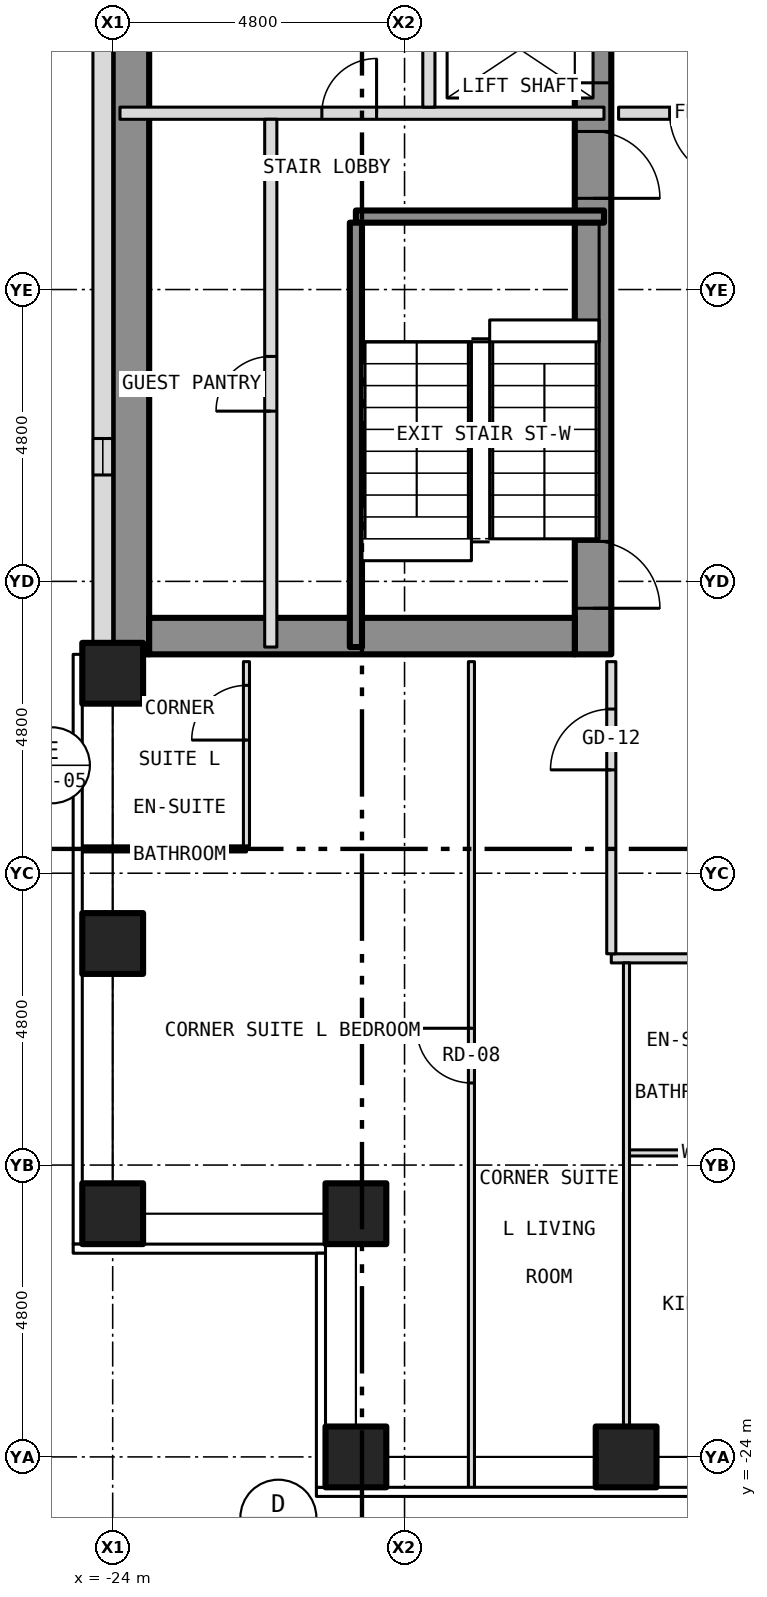
"""IFC4 building model, lengths in metres.
Left out: names, types, materials, properties, quantities, classifications, styles, units other than length and angle.
Written with IfcOpenShell. Run it as: python <this file> out.ifc"""

import sys

from ifc_helpers import new_model, si_unit, direction, frame, frame_2d, origin, origin_2d, place, context, subcontext, project, spatial, rectangle, hollow_rectangle, extrude, element, fill, save


model = new_model("IFC4")
c1 = context("Model", 3, precision=1e-05, world=origin(), true_north=direction((0.0, 1.0)))
c2 = subcontext(c1, "Body", "Model", "MODEL_VIEW")
j1 = project(units=[si_unit("LENGTHUNIT", "METRE"), si_unit("PLANEANGLEUNIT", "RADIAN")], contexts=[c1])
p1 = place(None, origin())
s1 = spatial("IfcSite", under=j1, at=p1, CompositionType="ELEMENT")
p2 = place(p1, origin())
s2 = spatial("IfcBuilding", under=s1, at=p2, CompositionType="ELEMENT")
p3 = place(p2, frame((0.0, 0.0, 53.0)))
s3 = spatial("IfcBuildingStorey", under=s2, at=p3, CompositionType="ELEMENT", Elevation=53.0)
for number, where, z_axis, x_axis in (
    (1, (-20.0, -24.0, -0.15), (0.0, 0.0, 1.0), (1.0, 0.0, 0.0)),
    (2, (-15.556, -24.0, -0.15), (0.0, 0.0, 1.0), (1.0, 0.0, 0.0)),
    (3, (-24.0, -20.0, -0.15), (0.0, 0.0, 1.0), (1.0, 0.0, 0.0)),
    (4, (-24.0, -15.556, -0.15), (0.0, 0.0, 1.0), (1.0, 0.0, 0.0)),
    (5, (-24.0, -11.111, -0.15), (0.0, 0.0, 1.0), (1.0, 0.0, 0.0)),
    (6, (-20.0, -20.0, -0.15), (0.0, 0.0, 1.0), (1.0, 0.0, 0.0)),
):
    element("IfcColumn", number, at=place(p3, frame(where, z_axis=z_axis, x_axis=x_axis)), inside=s3, PredefinedType="COLUMN", context=c2, shape_type="SweptSolid", body=[
        extrude(hollow_rectangle(XDim=1.0, YDim=1.0, WallThickness=0.06, at=origin_2d()), origin(), (0.0, 0.0, 1.0), 3.5),
    ])
p4 = place(p3, frame((-16.1, -10.8, 0.0), z_axis=(0.0, 0.0, 1.0), x_axis=(0.0, 1.0, 0.0)))
e7 = element("IfcWall", 7, at=p4, inside=s3, PredefinedType="SHEAR", context=c2, shape_type="SweptSolid", body=[
    extrude(rectangle(XDim=21.6, YDim=0.6, at=frame_2d((10.8, 0.0))), origin(), (0.0, 0.0, 1.0), 3.25),
])
p5 = place(p4, frame((9.4, 0.0, 0.0)))
e8 = element("IfcOpeningElement", 8, at=p5, cuts=e7, PredefinedType="OPENING", context=c2, shape_type="SweptSolid", body=[
    extrude(rectangle(XDim=1.1, YDim=2.1, at=frame_2d((0.55, 1.05))), frame((0.0, 0.312, 0.0), z_axis=(0.0, -1.0, 0.0), x_axis=(1.0, 0.0, 0.0)), (0.0, 0.0, 1.0), 0.624),
])
p6 = place(p4, frame((11.5, 0.0, 0.0)))
e9 = element("IfcOpeningElement", 9, at=p6, cuts=e7, PredefinedType="OPENING", context=c2, shape_type="SweptSolid", body=[
    extrude(rectangle(XDim=1.1, YDim=2.1, at=frame_2d((0.55, 1.05))), frame((0.0, 0.312, 0.0), z_axis=(0.0, -1.0, 0.0), x_axis=(1.0, 0.0, 0.0)), (0.0, 0.0, 1.0), 0.624),
])
p7 = place(p4, frame((13.6, 0.0, 0.0)))
e10 = element("IfcOpeningElement", 10, at=p7, cuts=e7, PredefinedType="OPENING", context=c2, shape_type="SweptSolid", body=[
    extrude(rectangle(XDim=1.1, YDim=2.1, at=frame_2d((0.55, 1.05))), frame((0.0, 0.312, 0.0), z_axis=(0.0, -1.0, 0.0), x_axis=(1.0, 0.0, 0.0)), (0.0, 0.0, 1.0), 0.624),
])
p8 = place(p4, frame((15.7, 0.0, 0.0)))
e11 = element("IfcOpeningElement", 11, at=p8, cuts=e7, PredefinedType="OPENING", context=c2, shape_type="SweptSolid", body=[
    extrude(rectangle(XDim=1.1, YDim=2.1, at=frame_2d((0.55, 1.05))), frame((0.0, 0.312, 0.0), z_axis=(0.0, -1.0, 0.0), x_axis=(1.0, 0.0, 0.0)), (0.0, 0.0, 1.0), 0.624),
])
p9 = place(p4, frame((17.8, 0.0, 0.0)))
e12 = element("IfcOpeningElement", 12, at=p9, cuts=e7, PredefinedType="OPENING", context=c2, shape_type="SweptSolid", body=[
    extrude(rectangle(XDim=1.1, YDim=2.1, at=frame_2d((0.55, 1.05))), frame((0.0, 0.312, 0.0), z_axis=(0.0, -1.0, 0.0), x_axis=(1.0, 0.0, 0.0)), (0.0, 0.0, 1.0), 0.624),
])
p10 = place(p4, frame((0.758, 0.0, 0.0)))
e13 = element("IfcOpeningElement", 13, at=p10, cuts=e7, PredefinedType="OPENING", context=c2, shape_type="SweptSolid", body=[
    extrude(rectangle(XDim=1.1, YDim=2.1, at=frame_2d((0.55, 1.05))), frame((0.0, 0.312, 0.0), z_axis=(0.0, -1.0, 0.0), x_axis=(1.0, 0.0, 0.0)), (0.0, 0.0, 1.0), 0.624),
])
p11 = place(p4, frame((7.5, 0.0, 0.0)))
e14 = element("IfcOpeningElement", 14, at=p11, cuts=e7, PredefinedType="OPENING", context=c2, shape_type="SweptSolid", body=[
    extrude(rectangle(XDim=1.1, YDim=2.1, at=frame_2d((0.55, 1.05))), frame((0.0, 0.312, 0.0), z_axis=(0.0, -1.0, 0.0), x_axis=(1.0, 0.0, 0.0)), (0.0, 0.0, 1.0), 0.624),
])
p12 = place(p3, frame((-23.7, -10.8, 0.0), z_axis=(0.0, 0.0, 1.0), x_axis=(0.0, 1.0, 0.0)))
e15 = element("IfcWall", 15, at=p12, inside=s3, PredefinedType="SHEAR", context=c2, shape_type="SweptSolid", body=[
    extrude(rectangle(XDim=21.6, YDim=0.6, at=frame_2d((10.8, 0.0))), origin(), (0.0, 0.0, 1.0), 3.25),
])
p13 = place(p3, frame((-23.4, -10.5, 0.0), z_axis=(0.0, 0.0, 1.0), x_axis=(1.0, 0.0, 0.0)))
e16 = element("IfcWall", 16, at=p13, inside=s3, PredefinedType="SHEAR", context=c2, shape_type="SweptSolid", body=[
    extrude(rectangle(XDim=7.0, YDim=0.6, at=frame_2d((3.5, 0.0))), origin(), (0.0, 0.0, 1.0), 3.25),
])
p14 = place(p3, frame((-24.163, 10.8, 0.0), z_axis=(0.0, 0.0, 1.0), x_axis=(0.0, -1.0, 0.0)))
e17 = element("IfcWall", 17, at=p14, inside=s3, PredefinedType="SOLIDWALL", context=c2, shape_type="SweptSolid", body=[
    extrude(rectangle(XDim=21.6, YDim=0.325, at=frame_2d((10.8, 0.0))), origin(), (0.0, 0.0, 1.0), 3.5),
])
p15 = place(p14, frame((18.05, 0.0, 1.0)))
e18 = element("IfcOpeningElement", 18, at=p15, cuts=e17, PredefinedType="OPENING", context=c2, shape_type="SweptSolid", body=[
    extrude(rectangle(XDim=0.6, YDim=1.5, at=frame_2d((0.3, 0.75))), frame((0.0, 0.175, 0.0), z_axis=(0.0, -1.0, 0.0), x_axis=(1.0, 0.0, 0.0)), (0.0, 0.0, 1.0), 0.349),
])
p16 = place(p3, frame((-15.55, -19.0, 0.0), z_axis=(0.0, 0.0, 1.0), x_axis=(1.0, 0.0, 0.0)))
e19 = element("IfcWall", 19, at=p16, inside=s3, PredefinedType="PARTITIONING", context=c2, shape_type="SweptSolid", body=[
    extrude(rectangle(XDim=2.2, YDim=0.1, at=frame_2d((1.1, 0.0))), origin(), (0.0, 0.0, 1.0), 3.35),
])
p17 = place(p3, frame((-15.8, -15.8, 0.0), z_axis=(0.0, 0.0, 1.0), x_axis=(1.0, 0.0, 0.0)))
e20 = element("IfcWall", 20, at=p17, inside=s3, PredefinedType="PARTITIONING", context=c2, shape_type="SweptSolid", body=[
    extrude(rectangle(XDim=31.6, YDim=0.15, at=frame_2d((15.8, 0.0))), origin(), (0.0, 0.0, 1.0), 3.35),
])
p18 = place(p17, frame((3.067, 0.0, 0.0)))
e21 = element("IfcOpeningElement", 21, at=p18, cuts=e20, PredefinedType="OPENING", context=c2, shape_type="SweptSolid", body=[
    extrude(rectangle(XDim=1.0, YDim=2.1, at=frame_2d((0.5, 1.05))), frame((0.0, 0.087, 0.0), z_axis=(0.0, -1.0, 0.0), x_axis=(1.0, 0.0, 0.0)), (0.0, 0.0, 1.0), 0.174),
])
p19 = place(p17, frame((5.311, 0.0, 0.0)))
e22 = element("IfcOpeningElement", 22, at=p19, cuts=e20, PredefinedType="OPENING", context=c2, shape_type="SweptSolid", body=[
    extrude(rectangle(XDim=1.0, YDim=2.1, at=frame_2d((0.5, 1.05))), frame((0.0, 0.087, 0.0), z_axis=(0.0, -1.0, 0.0), x_axis=(1.0, 0.0, 0.0)), (0.0, 0.0, 1.0), 0.174),
])
p20 = place(p17, frame((9.756, 0.0, 0.0)))
e23 = element("IfcOpeningElement", 23, at=p20, cuts=e20, PredefinedType="OPENING", context=c2, shape_type="SweptSolid", body=[
    extrude(rectangle(XDim=1.0, YDim=2.1, at=frame_2d((0.5, 1.05))), frame((0.0, 0.087, 0.0), z_axis=(0.0, -1.0, 0.0), x_axis=(1.0, 0.0, 0.0)), (0.0, 0.0, 1.0), 0.174),
])
p21 = place(p17, frame((15.311, 0.0, 0.0)))
e24 = element("IfcOpeningElement", 24, at=p21, cuts=e20, PredefinedType="OPENING", context=c2, shape_type="SweptSolid", body=[
    extrude(rectangle(XDim=1.0, YDim=2.1, at=frame_2d((0.5, 1.05))), frame((0.0, 0.087, 0.0), z_axis=(0.0, -1.0, 0.0), x_axis=(1.0, 0.0, 0.0)), (0.0, 0.0, 1.0), 0.174),
])
p22 = place(p17, frame((22.245, 0.0, 0.0)))
e25 = element("IfcOpeningElement", 25, at=p22, cuts=e20, PredefinedType="OPENING", context=c2, shape_type="SweptSolid", body=[
    extrude(rectangle(XDim=1.0, YDim=2.1, at=frame_2d((0.5, 1.05))), frame((0.0, 0.087, 0.0), z_axis=(0.0, -1.0, 0.0), x_axis=(1.0, 0.0, 0.0)), (0.0, 0.0, 1.0), 0.174),
])
p23 = place(p3, frame((-24.53, -14.0, 0.0), z_axis=(0.0, 0.0, 1.0), x_axis=(1.0, 0.0, 0.0)))
e26 = element("IfcWall", 26, at=p23, inside=s3, PredefinedType="PARTITIONING", context=c2, shape_type="SweptSolid", body=[
    extrude(rectangle(XDim=2.73, YDim=0.1, at=frame_2d((1.365, 0.0))), origin(), (0.0, 0.0, 1.0), 3.35),
])
p24 = place(p3, frame((-20.0, -3.6, 0.0), z_axis=(0.0, 0.0, 1.0), x_axis=(1.0, 0.0, 0.0)))
e27 = element("IfcWall", 27, at=p24, inside=s3, PredefinedType="SHEAR", context=c2, shape_type="SweptSolid", body=[
    extrude(rectangle(XDim=4.08, YDim=0.2, at=frame_2d((2.04, 0.0))), origin(), (0.0, 0.0, 1.0), 3.25),
])
p25 = place(p3, frame((-23.88, -1.9, 0.0), z_axis=(0.0, 0.0, 1.0), x_axis=(1.0, 0.0, 0.0)))
e28 = element("IfcWall", 28, at=p25, inside=s3, PredefinedType="PARTITIONING", context=c2, shape_type="SweptSolid", body=[
    extrude(rectangle(XDim=7.96, YDim=0.2, at=frame_2d((3.98, 0.0))), origin(), (0.0, 0.0, 1.0), 3.25),
])
p26 = place(p25, frame((3.32, 0.0, 0.0)))
e29 = element("IfcOpeningElement", 29, at=p26, cuts=e28, PredefinedType="OPENING", context=c2, shape_type="SweptSolid", body=[
    extrude(rectangle(XDim=0.9, YDim=2.1, at=frame_2d((0.45, 1.05))), frame((0.0, 0.112, 0.0), z_axis=(0.0, -1.0, 0.0), x_axis=(1.0, 0.0, 0.0)), (0.0, 0.0, 1.0), 0.224),
])
p27 = place(p3, frame((-15.68, -1.9, 0.0), z_axis=(0.0, 0.0, 1.0), x_axis=(1.0, 0.0, 0.0)))
e30 = element("IfcWall", 30, at=p27, inside=s3, PredefinedType="PARTITIONING", context=c2, shape_type="SweptSolid", body=[
    extrude(rectangle(XDim=3.28, YDim=0.2, at=frame_2d((1.64, 0.0))), origin(), (0.0, 0.0, 1.0), 3.35),
])
p28 = place(p27, frame((0.84, 0.0, 0.0)))
e31 = element("IfcOpeningElement", 31, at=p28, cuts=e30, PredefinedType="OPENING", context=c2, shape_type="SweptSolid", body=[
    extrude(rectangle(XDim=1.1, YDim=2.1, at=frame_2d((0.55, 1.05))), frame((0.0, 0.112, 0.0), z_axis=(0.0, -1.0, 0.0), x_axis=(1.0, 0.0, 0.0)), (0.0, 0.0, 1.0), 0.224),
])
p29 = place(p3, frame((-21.8, -13.95, 0.0), z_axis=(0.0, 0.0, 1.0), x_axis=(0.0, 1.0, 0.0)))
e32 = element("IfcWall", 32, at=p29, inside=s3, PredefinedType="PARTITIONING", context=c2, shape_type="SweptSolid", body=[
    extrude(rectangle(XDim=3.03, YDim=0.1, at=frame_2d((1.515, 0.0))), origin(), (0.0, 0.0, 1.0), 3.35),
])
p30 = place(p29, frame((1.74, 0.0, 0.0)))
e33 = element("IfcOpeningElement", 33, at=p30, cuts=e32, PredefinedType="OPENING", context=c2, shape_type="SweptSolid", body=[
    extrude(rectangle(XDim=0.9, YDim=2.1, at=frame_2d((0.45, 1.05))), frame((0.0, 0.062, 0.0), z_axis=(0.0, -1.0, 0.0), x_axis=(1.0, 0.0, 0.0)), (0.0, 0.0, 1.0), 0.124),
])
p31 = place(p3, frame((-21.4, -10.68, 0.0), z_axis=(0.0, 0.0, 1.0), x_axis=(0.0, 1.0, 0.0)))
e34 = element("IfcWall", 34, at=p31, inside=s3, PredefinedType="PARTITIONING", context=c2, shape_type="SweptSolid", body=[
    extrude(rectangle(XDim=8.68, YDim=0.2, at=frame_2d((4.34, 0.0))), origin(), (0.0, 0.0, 1.0), 3.25),
])
p32 = place(p31, frame((3.88, 0.0, 0.0)))
e35 = element("IfcOpeningElement", 35, at=p32, cuts=e34, PredefinedType="OPENING", context=c2, shape_type="SweptSolid", body=[
    extrude(rectangle(XDim=0.9, YDim=2.1, at=frame_2d((0.45, 1.05))), frame((0.0, 0.112, 0.0), z_axis=(0.0, -1.0, 0.0), x_axis=(1.0, 0.0, 0.0)), (0.0, 0.0, 1.0), 0.224),
])
p33 = place(p3, frame((-20.0, -10.68, 0.0), z_axis=(0.0, 0.0, 1.0), x_axis=(0.0, 1.0, 0.0)))
e36 = element("IfcWall", 36, at=p33, inside=s3, PredefinedType="SHEAR", context=c2, shape_type="SweptSolid", body=[
    extrude(rectangle(XDim=6.98, YDim=0.2, at=frame_2d((3.49, 0.0))), origin(), (0.0, 0.0, 1.0), 3.25),
])
p34 = place(p3, frame((-18.8, -1.8, 0.0), z_axis=(0.0, 0.0, 1.0), x_axis=(0.0, 1.0, 0.0)))
e37 = element("IfcWall", 37, at=p34, inside=s3, PredefinedType="PARTITIONING", context=c2, shape_type="SweptSolid", body=[
    extrude(rectangle(XDim=6.15, YDim=0.2, at=frame_2d((3.075, 0.0))), origin(), (0.0, 0.0, 1.0), 3.25),
])
p35 = place(p3, frame((-18.1, -24.53, 0.0), z_axis=(0.0, 0.0, 1.0), x_axis=(0.0, 1.0, 0.0)))
e38 = element("IfcWall", 38, at=p35, inside=s3, PredefinedType="PARTITIONING", context=c2, shape_type="SweptSolid", body=[
    extrude(rectangle(XDim=13.61, YDim=0.1, at=frame_2d((6.805, 0.0))), origin(), (0.0, 0.0, 1.0), 3.35),
])
p36 = place(p35, frame((6.68, 0.0, 0.0)))
e39 = element("IfcOpeningElement", 39, at=p36, cuts=e38, PredefinedType="OPENING", context=c2, shape_type="SweptSolid", body=[
    extrude(rectangle(XDim=0.9, YDim=2.1, at=frame_2d((0.45, 1.05))), frame((0.0, 0.062, 0.0), z_axis=(0.0, -1.0, 0.0), x_axis=(1.0, 0.0, 0.0)), (0.0, 0.0, 1.0), 0.124),
])
p37 = place(p3, frame((-15.8, -15.725, 0.0), z_axis=(0.0, 0.0, 1.0), x_axis=(0.0, 1.0, 0.0)))
e40 = element("IfcWall", 40, at=p37, inside=s3, PredefinedType="PARTITIONING", context=c2, shape_type="SweptSolid", body=[
    extrude(rectangle(XDim=4.805, YDim=0.15, at=frame_2d((2.403, 0.0))), origin(), (0.0, 0.0, 1.0), 3.35),
])
p38 = place(p37, frame((3.025, 0.0, 0.0)))
e41 = element("IfcOpeningElement", 41, at=p38, cuts=e40, PredefinedType="OPENING", context=c2, shape_type="SweptSolid", body=[
    extrude(rectangle(XDim=1.0, YDim=2.1, at=frame_2d((0.5, 1.05))), frame((0.0, 0.087, 0.0), z_axis=(0.0, -1.0, 0.0), x_axis=(1.0, 0.0, 0.0)), (0.0, 0.0, 1.0), 0.174),
])
p39 = place(p3, frame((-15.55, -23.88, 0.0), z_axis=(0.0, 0.0, 1.0), x_axis=(0.0, 1.0, 0.0)))
e42 = element("IfcWall", 42, at=p39, inside=s3, PredefinedType="PARTITIONING", context=c2, shape_type="SweptSolid", body=[
    extrude(rectangle(XDim=8.005, YDim=0.1, at=frame_2d((4.002, 0.0))), origin(), (0.0, 0.0, 1.0), 3.35),
])
p40 = place(p15, origin())
e43 = element("IfcWindow", 43, at=p40, inside=s3, PartitioningType="SINGLE_PANEL", PredefinedType="WINDOW", context=c2, shape_type="SweptSolid", body=[
    extrude(rectangle(XDim=0.6, YDim=1.5, at=frame_2d((0.3, 0.75))), frame((0.0, -0.073, 0.0), z_axis=(0.0, -1.0, 0.0), x_axis=(1.0, 0.0, 0.0)), (0.0, 0.0, 1.0), 0.06),
])
fill(e18, e43)
p41 = place(p5, origin())
e44 = element("IfcDoor", 44, at=p41, inside=s3, OperationType="SLIDING_TO_LEFT", PredefinedType="DOOR", context=c2, shape_type="SweptSolid", body=[
    extrude(rectangle(XDim=1.1, YDim=2.1, at=frame_2d((0.55, 1.05))), frame((0.0, 0.025, 0.0), z_axis=(0.0, -1.0, 0.0), x_axis=(1.0, 0.0, 0.0)), (0.0, 0.0, 1.0), 0.05),
])
fill(e8, e44)
p42 = place(p10, origin())
e45 = element("IfcDoor", 45, at=p42, inside=s3, OperationType="SINGLE_SWING_LEFT", PredefinedType="DOOR", context=c2, shape_type="SweptSolid", body=[
    extrude(rectangle(XDim=1.1, YDim=2.1, at=frame_2d((0.55, 1.05))), frame((0.0, 0.025, 0.0), z_axis=(0.0, -1.0, 0.0), x_axis=(1.0, 0.0, 0.0)), (0.0, 0.0, 1.0), 0.05),
])
fill(e13, e45)
p43 = place(p11, origin())
e46 = element("IfcDoor", 46, at=p43, inside=s3, OperationType="SINGLE_SWING_LEFT", PredefinedType="DOOR", context=c2, shape_type="SweptSolid", body=[
    extrude(rectangle(XDim=1.1, YDim=2.1, at=frame_2d((0.55, 1.05))), frame((0.0, 0.025, 0.0), z_axis=(0.0, -1.0, 0.0), x_axis=(1.0, 0.0, 0.0)), (0.0, 0.0, 1.0), 0.05),
])
fill(e14, e46)
p44 = place(p32, origin())
e47 = element("IfcDoor", 47, at=p44, inside=s3, OperationType="SINGLE_SWING_LEFT", PredefinedType="DOOR", context=c2, shape_type="SweptSolid", body=[
    extrude(rectangle(XDim=0.9, YDim=2.1, at=frame_2d((0.45, 1.05))), frame((0.0, 0.025, 0.0), z_axis=(0.0, -1.0, 0.0), x_axis=(1.0, 0.0, 0.0)), (0.0, 0.0, 1.0), 0.05),
])
fill(e35, e47)
p45 = place(p26, origin())
e48 = element("IfcDoor", 48, at=p45, inside=s3, OperationType="SINGLE_SWING_RIGHT", PredefinedType="DOOR", context=c2, shape_type="SweptSolid", body=[
    extrude(rectangle(XDim=0.9, YDim=2.1, at=frame_2d((0.45, 1.05))), frame((0.0, 0.025, 0.0), z_axis=(0.0, -1.0, 0.0), x_axis=(1.0, 0.0, 0.0)), (0.0, 0.0, 1.0), 0.05),
])
fill(e29, e48)
p46 = place(p28, origin())
e49 = element("IfcDoor", 49, at=p46, inside=s3, OperationType="SINGLE_SWING_RIGHT", PredefinedType="DOOR", context=c2, shape_type="SweptSolid", body=[
    extrude(rectangle(XDim=1.1, YDim=2.1, at=frame_2d((0.55, 1.05))), frame((0.0, 0.025, 0.0), z_axis=(0.0, -1.0, 0.0), x_axis=(1.0, 0.0, 0.0)), (0.0, 0.0, 1.0), 0.05),
])
fill(e31, e49)
p47 = place(p38, origin())
e50 = element("IfcDoor", 50, at=p47, inside=s3, OperationType="SINGLE_SWING_LEFT", PredefinedType="DOOR", context=c2, shape_type="SweptSolid", body=[
    extrude(rectangle(XDim=1.0, YDim=2.1, at=frame_2d((0.5, 1.05))), frame((0.0, 0.025, 0.0), z_axis=(0.0, -1.0, 0.0), x_axis=(1.0, 0.0, 0.0)), (0.0, 0.0, 1.0), 0.05),
])
fill(e41, e50)
p48 = place(p36, origin())
e51 = element("IfcDoor", 51, at=p48, inside=s3, OperationType="SINGLE_SWING_RIGHT", PredefinedType="DOOR", context=c2, shape_type="SweptSolid", body=[
    extrude(rectangle(XDim=0.9, YDim=2.1, at=frame_2d((0.45, 1.05))), frame((0.0, 0.025, 0.0), z_axis=(0.0, -1.0, 0.0), x_axis=(1.0, 0.0, 0.0)), (0.0, 0.0, 1.0), 0.05),
])
fill(e39, e51)
p49 = place(p30, origin())
e52 = element("IfcDoor", 52, at=p49, inside=s3, OperationType="SINGLE_SWING_LEFT", PredefinedType="DOOR", context=c2, shape_type="SweptSolid", body=[
    extrude(rectangle(XDim=0.9, YDim=2.1, at=frame_2d((0.45, 1.05))), frame((0.0, 0.025, 0.0), z_axis=(0.0, -1.0, 0.0), x_axis=(1.0, 0.0, 0.0)), (0.0, 0.0, 1.0), 0.05),
])
fill(e33, e52)
save(model, sys.argv[1])
